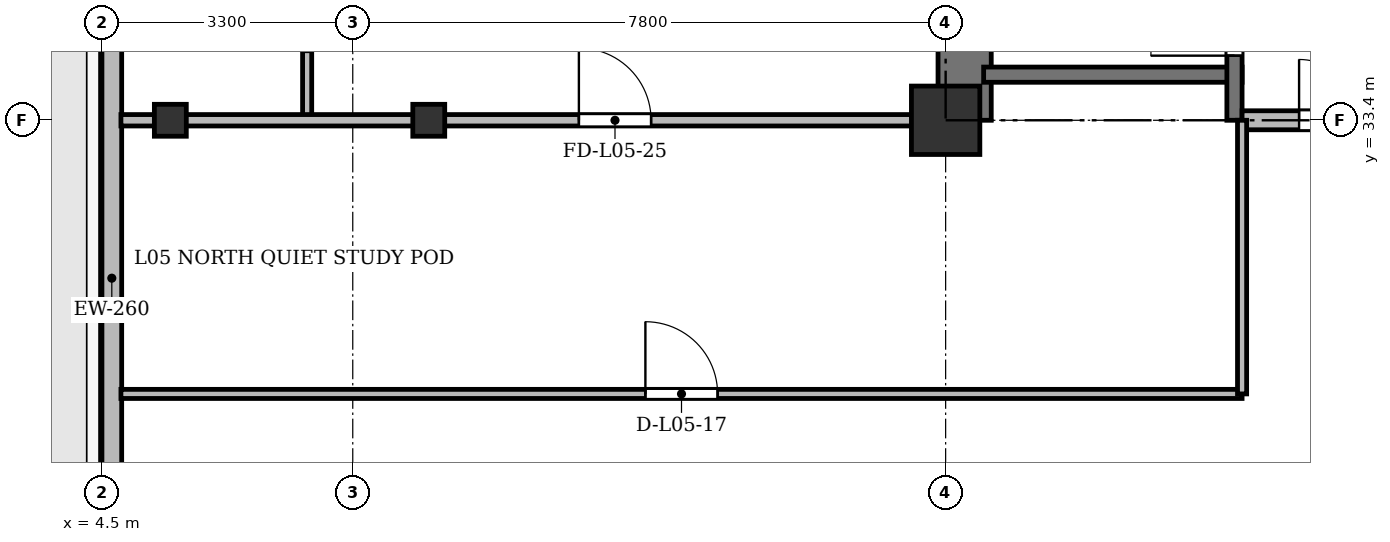
"""IFC4 building model, lengths in metres.
Left out: names, types, materials, properties, quantities, classifications, styles, units other than length and angle.
Written with IfcOpenShell. Run it as: python <this file> out.ifc"""

import sys

from ifc_helpers import new_model, si_unit, direction, frame, frame_2d, origin, origin_2d, place, context, subcontext, project, spatial, rectangle, i_section, extrude, source, transform, mapped, element, fill, save


model = new_model("IFC4")
c1 = context("Model", 3, precision=1e-05, world=origin(), true_north=direction((0.0, 1.0)))
c2 = subcontext(c1, "Body", "Model", "MODEL_VIEW")
j1 = project(units=[si_unit("LENGTHUNIT", "METRE"), si_unit("PLANEANGLEUNIT", "RADIAN")], contexts=[c1])
p1 = place(None, origin())
s1 = spatial("IfcSite", under=j1, at=p1, CompositionType="ELEMENT")
p2 = place(p1, origin())
s2 = spatial("IfcBuilding", under=s1, at=p2, CompositionType="ELEMENT")
p3 = place(p2, frame((0.0, 0.0, 23.5)))
s3 = spatial("IfcBuildingStorey", under=s2, at=p3, CompositionType="ELEMENT", Elevation=23.5)
m1 = source(origin(), c2, "Body", "SweptSolid", [
    extrude(i_section(OverallWidth=0.42, OverallDepth=0.42, WebThickness=0.026, FlangeThickness=0.04, at=origin_2d()), origin(), (0.0, 0.0, 1.0), 3.6),
])
for number, where, z_axis, x_axis in (
    (1, (5.4, 33.4, 0.0), (0.0, 0.0, 1.0), (1.0, 0.0, 0.0)),
    (2, (8.8, 33.4, 0.0), (0.0, 0.0, 1.0), (1.0, 0.0, 0.0)),
):
    element("IfcColumn", number, at=place(p3, frame(where, z_axis=z_axis, x_axis=x_axis)), inside=s3, PredefinedType="COLUMN", context=c2, shape_type="MappedRepresentation", body=[
        mapped(m1, transform((0.0, 0.0, 0.0), x_axis=(1.0, 0.0, 0.0), y_axis=(0.0, 1.0, 0.0), z_axis=(0.0, 0.0, 1.0), scale=1.0)),
    ])
m2 = source(origin(), c2, "Body", "SweptSolid", [
    extrude(rectangle(XDim=0.9, YDim=0.9, at=origin_2d()), origin(), (0.0, 0.0, 1.0), 3.6),
])
p4 = place(p3, frame((15.6, 33.4, 0.0), z_axis=(0.0, 0.0, 1.0), x_axis=(1.0, 0.0, 0.0)))
e3 = element("IfcColumn", 3, at=p4, inside=s3, PredefinedType="COLUMN", context=c2, shape_type="MappedRepresentation", body=[
    mapped(m2, transform((0.0, 0.0, 0.0), x_axis=(1.0, 0.0, 0.0), y_axis=(0.0, 1.0, 0.0), z_axis=(0.0, 0.0, 1.0), scale=1.0)),
])
p5 = place(p3, frame((4.63, 5.9, 0.0), z_axis=(0.0, 0.0, 1.0), x_axis=(0.0, 1.0, 0.0)))
e4 = element("IfcWall", 4, at=p5, inside=s3, PredefinedType="SOLIDWALL", context=c2, shape_type="SweptSolid", body=[
    extrude(rectangle(XDim=39.6, YDim=0.26, at=frame_2d((19.8, 0.0))), origin(), (0.0, 0.0, 1.0), 3.34),
])
p6 = place(p5, frame((9.745, 0.0, 0.0)))
e5 = element("IfcOpeningElement", 5, at=p6, cuts=e4, PredefinedType="OPENING", context=c2, shape_type="SweptSolid", body=[
    extrude(rectangle(XDim=1.2, YDim=2.2, at=frame_2d((0.6, 1.1))), frame((0.0, 0.14, 0.0), z_axis=(0.0, -1.0, 0.0), x_axis=(1.0, 0.0, 0.0)), (0.0, 0.0, 1.0), 0.28),
])
p7 = place(p5, frame((1.45, 0.0, 0.92)))
e6 = element("IfcOpeningElement", 6, at=p7, cuts=e4, PredefinedType="OPENING", context=c2, shape_type="SweptSolid", body=[
    extrude(rectangle(XDim=1.2, YDim=1.65, at=frame_2d((0.6, 0.825))), frame((0.0, 0.14, 0.0), z_axis=(0.0, -1.0, 0.0), x_axis=(1.0, 0.0, 0.0)), (0.0, 0.0, 1.0), 0.28),
])
p8 = place(p5, frame((4.3, 0.0, 0.92)))
e7 = element("IfcOpeningElement", 7, at=p8, cuts=e4, PredefinedType="OPENING", context=c2, shape_type="SweptSolid", body=[
    extrude(rectangle(XDim=2.4, YDim=2.1, at=frame_2d((1.2, 1.05))), frame((0.0, 0.14, 0.0), z_axis=(0.0, -1.0, 0.0), x_axis=(1.0, 0.0, 0.0)), (0.0, 0.0, 1.0), 0.28),
])
p9 = place(p5, frame((33.9, 0.0, 0.92)))
e8 = element("IfcOpeningElement", 8, at=p9, cuts=e4, PredefinedType="OPENING", context=c2, shape_type="SweptSolid", body=[
    extrude(rectangle(XDim=1.2, YDim=1.65, at=frame_2d((0.6, 0.825))), frame((0.0, 0.14, 0.0), z_axis=(0.0, -1.0, 0.0), x_axis=(1.0, 0.0, 0.0)), (0.0, 0.0, 1.0), 0.28),
])
p10 = place(p5, frame((37.25, 0.0, 0.92)))
e9 = element("IfcOpeningElement", 9, at=p10, cuts=e4, PredefinedType="OPENING", context=c2, shape_type="SweptSolid", body=[
    extrude(rectangle(XDim=1.2, YDim=1.65, at=frame_2d((0.6, 0.825))), frame((0.0, 0.14, 0.0), z_axis=(0.0, -1.0, 0.0), x_axis=(1.0, 0.0, 0.0)), (0.0, 0.0, 1.0), 0.28),
])
p11 = place(p3, frame((15.85, 33.4, 0.0), z_axis=(0.0, 0.0, 1.0), x_axis=(0.0, 1.0, 0.0)))
e10 = element("IfcWall", 10, at=p11, inside=s3, PredefinedType="SHEAR", context=c2, shape_type="SweptSolid", body=[
    extrude(rectangle(XDim=11.7, YDim=0.7, at=frame_2d((5.85, 0.0))), origin(), (0.0, 0.0, 1.0), 3.34),
])
p12 = place(p3, frame((16.1, 34.0, 0.0), z_axis=(0.0, 0.0, 1.0), x_axis=(1.0, 0.0, 0.0)))
e11 = element("IfcWall", 11, at=p12, inside=s3, PredefinedType="SHEAR", context=c2, shape_type="SweptSolid", body=[
    extrude(rectangle(XDim=3.4, YDim=0.2, at=frame_2d((1.7, 0.0))), origin(), (0.0, 0.0, 1.0), 3.34),
])
p13 = place(p3, frame((19.4, 33.4, 0.0), z_axis=(0.0, 0.0, 1.0), x_axis=(0.0, 1.0, 0.0)))
e12 = element("IfcWall", 12, at=p13, inside=s3, PredefinedType="SHEAR", context=c2, shape_type="SweptSolid", body=[
    extrude(rectangle(XDim=11.1, YDim=0.2, at=frame_2d((5.55, 0.0))), origin(), (0.0, 0.0, 1.0), 3.34),
])
p14 = place(p13, frame((0.85, 0.0, 0.0)))
e13 = element("IfcOpeningElement", 13, at=p14, cuts=e12, PredefinedType="OPENING", context=c2, shape_type="SweptSolid", body=[
    extrude(rectangle(XDim=1.1, YDim=2.15, at=frame_2d((0.55, 1.075))), frame((0.0, 0.11, 0.0), z_axis=(0.0, -1.0, 0.0), x_axis=(1.0, 0.0, 0.0)), (0.0, 0.0, 1.0), 0.22),
])
p15 = place(p3, frame((19.5, 33.4, 0.0), z_axis=(0.0, 0.0, 1.0), x_axis=(1.0, 0.0, 0.0)))
e14 = element("IfcWall", 14, at=p15, inside=s3, PredefinedType="PARTITIONING", context=c2, shape_type="SweptSolid", body=[
    extrude(rectangle(XDim=6.8, YDim=0.25, at=frame_2d((3.4, 0.0))), origin(), (0.0, 0.0, 1.0), 2.69),
])
p16 = place(p15, frame((0.75, 0.0, 0.0)))
e15 = element("IfcOpeningElement", 15, at=p16, cuts=e14, PredefinedType="OPENING", context=c2, shape_type="SweptSolid", body=[
    extrude(rectangle(XDim=1.6, YDim=2.2, at=frame_2d((0.8, 1.1))), frame((0.0, 0.135, 0.0), z_axis=(0.0, -1.0, 0.0), x_axis=(1.0, 0.0, 0.0)), (0.0, 0.0, 1.0), 0.27),
])
p17 = place(p3, frame((4.75, 29.8, 0.0), z_axis=(0.0, 0.0, 1.0), x_axis=(1.0, 0.0, 0.0)))
e16 = element("IfcWall", 16, at=p17, inside=s3, PredefinedType="PARTITIONING", context=c2, shape_type="SweptSolid", body=[
    extrude(rectangle(XDim=14.75, YDim=0.12, at=frame_2d((7.375, 0.0))), origin(), (0.0, 0.0, 1.0), 2.752),
])
p18 = place(p17, frame((6.9, 0.0, 0.0)))
e17 = element("IfcOpeningElement", 17, at=p18, cuts=e16, PredefinedType="OPENING", context=c2, shape_type="SweptSolid", body=[
    extrude(rectangle(XDim=0.95, YDim=2.15, at=frame_2d((0.475, 1.075))), frame((0.0, 0.07, 0.0), z_axis=(0.0, -1.0, 0.0), x_axis=(1.0, 0.0, 0.0)), (0.0, 0.0, 1.0), 0.14),
])
p19 = place(p3, frame((19.5, 29.8, 0.0), z_axis=(0.0, 0.0, 1.0), x_axis=(0.0, 1.0, 0.0)))
e18 = element("IfcWall", 18, at=p19, inside=s3, PredefinedType="PARTITIONING", context=c2, shape_type="SweptSolid", body=[
    extrude(rectangle(XDim=3.6, YDim=0.12, at=frame_2d((1.8, 0.0))), origin(), (0.0, 0.0, 1.0), 2.69),
])
p20 = place(p3, frame((7.2, 33.4, 0.0), z_axis=(0.0, 0.0, 1.0), x_axis=(0.0, 1.0, 0.0)))
e19 = element("IfcWall", 19, at=p20, inside=s3, PredefinedType="PARTITIONING", context=c2, shape_type="SweptSolid", body=[
    extrude(rectangle(XDim=3.25, YDim=0.12, at=frame_2d((1.625, 0.0))), origin(), (0.0, 0.0, 1.0), 2.69),
])
p21 = place(p20, frame((0.9, 0.0, 0.0)))
e20 = element("IfcOpeningElement", 20, at=p21, cuts=e19, PredefinedType="OPENING", context=c2, shape_type="SweptSolid", body=[
    extrude(rectangle(XDim=0.85, YDim=2.1, at=frame_2d((0.425, 1.05))), frame((0.0, 0.07, 0.0), z_axis=(0.0, -1.0, 0.0), x_axis=(1.0, 0.0, 0.0)), (0.0, 0.0, 1.0), 0.14),
])
p22 = place(p3, frame((4.75, 33.4, 0.0), z_axis=(0.0, 0.0, 1.0), x_axis=(1.0, 0.0, 0.0)))
e21 = element("IfcWall", 21, at=p22, inside=s3, PredefinedType="PARTITIONING", context=c2, shape_type="SweptSolid", body=[
    extrude(rectangle(XDim=10.85, YDim=0.15, at=frame_2d((5.425, 0.0))), origin(), (0.0, 0.0, 1.0), 2.69),
])
p23 = place(p22, frame((6.025, 0.0, 0.0)))
e22 = element("IfcOpeningElement", 22, at=p23, cuts=e21, PredefinedType="OPENING", context=c2, shape_type="SweptSolid", body=[
    extrude(rectangle(XDim=0.95, YDim=2.15, at=frame_2d((0.475, 1.075))), frame((0.0, 0.085, 0.0), z_axis=(0.0, -1.0, 0.0), x_axis=(1.0, 0.0, 0.0)), (0.0, 0.0, 1.0), 0.17),
])
m3 = source(origin(), c2, "Body", "SweptSolid", [
    extrude(rectangle(XDim=1.1, YDim=2.15, at=frame_2d((0.55, 1.075))), frame((0.0, 0.025, 0.0), z_axis=(0.0, -1.0, 0.0), x_axis=(1.0, 0.0, 0.0)), (0.0, 0.0, 1.0), 0.05),
])
p24 = place(p14, origin())
e23 = element("IfcDoor", 23, at=p24, inside=s3, OperationType="SINGLE_SWING_LEFT", PredefinedType="DOOR", context=c2, shape_type="MappedRepresentation", body=[
    mapped(m3, transform((0.0, 0.0, 0.0), x_axis=(1.0, 0.0, 0.0), y_axis=(0.0, 1.0, 0.0), z_axis=(0.0, 0.0, 1.0), scale=1.0)),
])
fill(e13, e23)
m4 = source(origin(), c2, "Body", "SweptSolid", [
    extrude(rectangle(XDim=1.6, YDim=2.2, at=frame_2d((0.8, 1.1))), frame((0.0, 0.025, 0.0), z_axis=(0.0, -1.0, 0.0), x_axis=(1.0, 0.0, 0.0)), (0.0, 0.0, 1.0), 0.05),
])
p25 = place(p16, origin())
e24 = element("IfcDoor", 24, at=p25, inside=s3, OperationType="DOUBLE_DOOR_SINGLE_SWING", PredefinedType="DOOR", context=c2, shape_type="MappedRepresentation", body=[
    mapped(m4, transform((0.0, 0.0, 0.0), x_axis=(1.0, 0.0, 0.0), y_axis=(0.0, 1.0, 0.0), z_axis=(0.0, 0.0, 1.0), scale=1.0)),
])
fill(e15, e24)
m5 = source(origin(), c2, "Body", "SweptSolid", [
    extrude(rectangle(XDim=0.95, YDim=2.15, at=frame_2d((0.475, 1.075))), frame((0.0, 0.025, 0.0), z_axis=(0.0, -1.0, 0.0), x_axis=(1.0, 0.0, 0.0)), (0.0, 0.0, 1.0), 0.05),
])
p26 = place(p18, origin())
e25 = element("IfcDoor", 25, at=p26, inside=s3, OperationType="SINGLE_SWING_LEFT", PredefinedType="DOOR", context=c2, shape_type="MappedRepresentation", body=[
    mapped(m5, transform((0.0, 0.0, 0.0), x_axis=(1.0, 0.0, 0.0), y_axis=(0.0, 1.0, 0.0), z_axis=(0.0, 0.0, 1.0), scale=1.0)),
])
fill(e17, e25)
m6 = source(origin(), c2, "Body", "SweptSolid", [
    extrude(rectangle(XDim=0.85, YDim=2.1, at=frame_2d((0.425, 1.05))), frame((0.0, 0.025, 0.0), z_axis=(0.0, -1.0, 0.0), x_axis=(1.0, 0.0, 0.0)), (0.0, 0.0, 1.0), 0.05),
])
p27 = place(p21, origin())
e26 = element("IfcDoor", 26, at=p27, inside=s3, OperationType="SINGLE_SWING_RIGHT", PredefinedType="DOOR", context=c2, shape_type="MappedRepresentation", body=[
    mapped(m6, transform((0.0, 0.0, 0.0), x_axis=(1.0, 0.0, 0.0), y_axis=(0.0, 1.0, 0.0), z_axis=(0.0, 0.0, 1.0), scale=1.0)),
])
fill(e20, e26)
p28 = place(p23, origin())
e27 = element("IfcDoor", 27, at=p28, inside=s3, OperationType="SINGLE_SWING_LEFT", PredefinedType="DOOR", context=c2, shape_type="MappedRepresentation", body=[
    mapped(m5, transform((0.0, 0.0, 0.0), x_axis=(1.0, 0.0, 0.0), y_axis=(0.0, 1.0, 0.0), z_axis=(0.0, 0.0, 1.0), scale=1.0)),
])
fill(e22, e27)
save(model, sys.argv[1])
